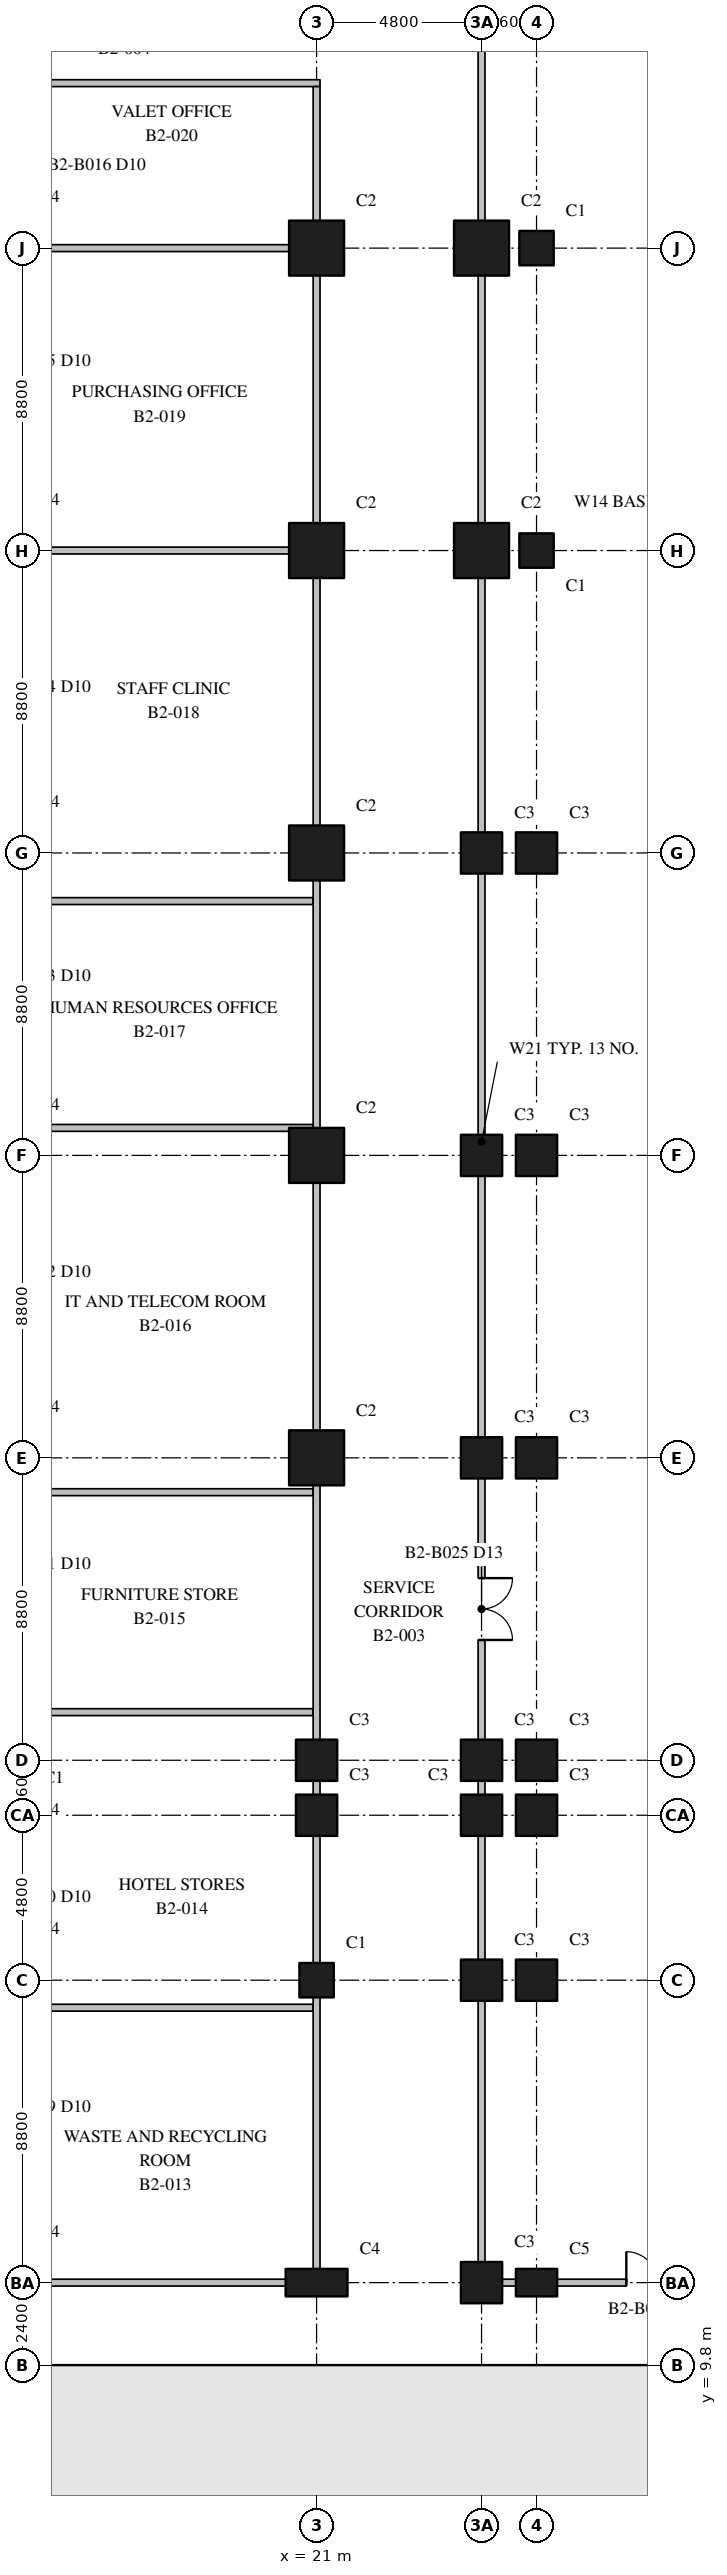
"""IFC4 building model, lengths in metres.
Left out: names, types, materials, properties, quantities, classifications, styles, units other than length and angle.
Written with IfcOpenShell. Run it as: python <this file> out.ifc"""

import sys

from ifc_helpers import new_model, si_unit, direction, frame, frame_2d, origin, origin_2d, place, context, subcontext, project, spatial, rectangle, extrude, element, fill, save


model = new_model("IFC4")
c1 = context("Model", 3, precision=1e-05, world=origin(), true_north=direction((0.0, 1.0)))
c2 = subcontext(c1, "Body", "Model", "MODEL_VIEW")
j1 = project(units=[si_unit("LENGTHUNIT", "METRE"), si_unit("PLANEANGLEUNIT", "RADIAN")], contexts=[c1])
p1 = place(None, origin())
s1 = spatial("IfcSite", under=j1, at=p1, CompositionType="ELEMENT")
p2 = place(p1, origin())
s2 = spatial("IfcBuilding", under=s1, at=p2, CompositionType="ELEMENT")
p3 = place(p2, frame((0.0, 0.0, -12.0)))
s3 = spatial("IfcBuildingStorey", under=s2, at=p3, CompositionType="ELEMENT", Elevation=-12.0)
p4 = place(p3, frame((21.0, 12.2, 0.0), z_axis=(0.0, 0.0, 1.0), x_axis=(1.0, 0.0, 0.0)))
e1 = element("IfcColumn", 1, at=p4, inside=s3, PredefinedType="COLUMN", context=c2, shape_type="SweptSolid", body=[
    extrude(rectangle(XDim=1.8, YDim=0.8, at=origin_2d()), origin(), (0.0, 0.0, 1.0), 5.0),
])
p5 = place(p3, frame((21.0, 21.0, 0.0), z_axis=(0.0, 0.0, 1.0), x_axis=(1.0, 0.0, 0.0)))
e2 = element("IfcColumn", 2, at=p5, inside=s3, PredefinedType="COLUMN", context=c2, shape_type="SweptSolid", body=[
    extrude(rectangle(XDim=1.0, YDim=1.0, at=origin_2d()), origin(), (0.0, 0.0, 1.0), 5.0),
])
for number, where, z_axis, x_axis in (
    (3, (21.0, 25.8, 0.0), (0.0, 0.0, 1.0), (1.0, 0.0, 0.0)),
    (4, (21.0, 27.4, 0.0), (0.0, 0.0, 1.0), (1.0, 0.0, 0.0)),
):
    element("IfcColumn", number, at=place(p3, frame(where, z_axis=z_axis, x_axis=x_axis)), inside=s3, PredefinedType="COLUMN", context=c2, shape_type="SweptSolid", body=[
        extrude(rectangle(XDim=1.2, YDim=1.2, at=origin_2d()), origin(), (0.0, 0.0, 1.0), 5.0),
    ])
for number, where, z_axis, x_axis in (
    (5, (21.0, 36.2, 0.0), (0.0, 0.0, 1.0), (1.0, 0.0, 0.0)),
    (6, (21.0, 45.0, 0.0), (0.0, 0.0, 1.0), (1.0, 0.0, 0.0)),
    (7, (21.0, 53.8, 0.0), (0.0, 0.0, 1.0), (1.0, 0.0, 0.0)),
    (8, (21.0, 62.6, 0.0), (0.0, 0.0, 1.0), (1.0, 0.0, 0.0)),
    (9, (21.0, 71.4, 0.0), (0.0, 0.0, 1.0), (1.0, 0.0, 0.0)),
):
    element("IfcColumn", number, at=place(p3, frame(where, z_axis=z_axis, x_axis=x_axis)), inside=s3, PredefinedType="COLUMN", context=c2, shape_type="SweptSolid", body=[
        extrude(rectangle(XDim=1.6, YDim=1.6, at=origin_2d()), origin(), (0.0, 0.0, 1.0), 5.0),
    ])
for number, where, z_axis, x_axis in (
    (10, (25.8, 12.2, 0.0), (0.0, 0.0, 1.0), (1.0, 0.0, 0.0)),
    (11, (25.8, 21.0, 0.0), (0.0, 0.0, 1.0), (1.0, 0.0, 0.0)),
    (12, (25.8, 25.8, 0.0), (0.0, 0.0, 1.0), (1.0, 0.0, 0.0)),
    (13, (25.8, 27.4, 0.0), (0.0, 0.0, 1.0), (1.0, 0.0, 0.0)),
    (14, (25.8, 36.2, 0.0), (0.0, 0.0, 1.0), (1.0, 0.0, 0.0)),
    (15, (25.8, 45.0, 0.0), (0.0, 0.0, 1.0), (1.0, 0.0, 0.0)),
    (16, (25.8, 53.8, 0.0), (0.0, 0.0, 1.0), (1.0, 0.0, 0.0)),
):
    element("IfcColumn", number, at=place(p3, frame(where, z_axis=z_axis, x_axis=x_axis)), inside=s3, PredefinedType="COLUMN", context=c2, shape_type="SweptSolid", body=[
        extrude(rectangle(XDim=1.2, YDim=1.2, at=origin_2d()), origin(), (0.0, 0.0, 1.0), 5.0),
    ])
for number, where, z_axis, x_axis in (
    (17, (25.8, 62.6, 0.0), (0.0, 0.0, 1.0), (1.0, 0.0, 0.0)),
    (18, (25.8, 71.4, 0.0), (0.0, 0.0, 1.0), (1.0, 0.0, 0.0)),
):
    element("IfcColumn", number, at=place(p3, frame(where, z_axis=z_axis, x_axis=x_axis)), inside=s3, PredefinedType="COLUMN", context=c2, shape_type="SweptSolid", body=[
        extrude(rectangle(XDim=1.6, YDim=1.6, at=origin_2d()), origin(), (0.0, 0.0, 1.0), 5.0),
    ])
p6 = place(p3, frame((27.4, 12.2, 0.0), z_axis=(0.0, 0.0, 1.0), x_axis=(1.0, 0.0, 0.0)))
e19 = element("IfcColumn", 19, at=p6, inside=s3, PredefinedType="COLUMN", context=c2, shape_type="SweptSolid", body=[
    extrude(rectangle(XDim=1.2, YDim=0.8, at=origin_2d()), origin(), (0.0, 0.0, 1.0), 5.0),
])
for number, where, z_axis, x_axis in (
    (20, (27.4, 21.0, 0.0), (0.0, 0.0, 1.0), (1.0, 0.0, 0.0)),
    (21, (27.4, 25.8, 0.0), (0.0, 0.0, 1.0), (1.0, 0.0, 0.0)),
    (22, (27.4, 27.4, 0.0), (0.0, 0.0, 1.0), (1.0, 0.0, 0.0)),
    (23, (27.4, 36.2, 0.0), (0.0, 0.0, 1.0), (1.0, 0.0, 0.0)),
    (24, (27.4, 45.0, 0.0), (0.0, 0.0, 1.0), (1.0, 0.0, 0.0)),
    (25, (27.4, 53.8, 0.0), (0.0, 0.0, 1.0), (1.0, 0.0, 0.0)),
):
    element("IfcColumn", number, at=place(p3, frame(where, z_axis=z_axis, x_axis=x_axis)), inside=s3, PredefinedType="COLUMN", context=c2, shape_type="SweptSolid", body=[
        extrude(rectangle(XDim=1.2, YDim=1.2, at=origin_2d()), origin(), (0.0, 0.0, 1.0), 5.0),
    ])
for number, where, z_axis, x_axis in (
    (26, (27.4, 62.6, 0.0), (0.0, 0.0, 1.0), (1.0, 0.0, 0.0)),
    (27, (27.4, 71.4, 0.0), (0.0, 0.0, 1.0), (1.0, 0.0, 0.0)),
):
    element("IfcColumn", number, at=place(p3, frame(where, z_axis=z_axis, x_axis=x_axis)), inside=s3, PredefinedType="COLUMN", context=c2, shape_type="SweptSolid", body=[
        extrude(rectangle(XDim=1.0, YDim=1.0, at=origin_2d()), origin(), (0.0, 0.0, 1.0), 5.0),
    ])
p7 = place(p3, frame((9.8, 9.6, 0.0), z_axis=(0.0, 0.0, 1.0), x_axis=(1.0, 0.0, 0.0)))
e28 = element("IfcWall", 28, at=p7, inside=s3, PredefinedType="SHEAR", context=c2, shape_type="SweptSolid", body=[
    extrude(rectangle(XDim=4.3, YDim=0.4, at=frame_2d((2.15, 0.0))), origin(), (0.0, 0.0, 1.0), 5.0),
])
p8 = place(p7, frame((2.05, 0.0, 0.0)))
e29 = element("IfcOpeningElement", 29, at=p8, cuts=e28, PredefinedType="OPENING", context=c2, shape_type="SweptSolid", body=[
    extrude(rectangle(XDim=1.2, YDim=2.1, at=frame_2d((0.6, 1.05))), frame((0.0, 0.21, 0.0), z_axis=(0.0, -1.0, 0.0), x_axis=(1.0, 0.0, 0.0)), (0.0, 0.0, 1.0), 0.42),
])
p9 = place(p3, frame((14.1, 9.6, 0.0), z_axis=(0.0, 0.0, 1.0), x_axis=(1.0, 0.0, 0.0)))
e30 = element("IfcWall", 30, at=p9, inside=s3, PredefinedType="SHEAR", context=c2, shape_type="SweptSolid", body=[
    extrude(rectangle(XDim=10.4, YDim=0.4, at=frame_2d((5.2, 0.0))), origin(), (0.0, 0.0, 1.0), 5.0),
])
p10 = place(p9, frame((0.8, 0.0, 0.0)))
e31 = element("IfcOpeningElement", 31, at=p10, cuts=e30, PredefinedType="OPENING", context=c2, shape_type="SweptSolid", body=[
    extrude(rectangle(XDim=1.0, YDim=2.1, at=frame_2d((0.5, 1.05))), frame((0.0, 0.21, 0.0), z_axis=(0.0, -1.0, 0.0), x_axis=(1.0, 0.0, 0.0)), (0.0, 0.0, 1.0), 0.42),
])
p11 = place(p3, frame((27.1, 9.6, 0.0), z_axis=(0.0, 0.0, 1.0), x_axis=(1.0, 0.0, 0.0)))
e32 = element("IfcWall", 32, at=p11, inside=s3, PredefinedType="SHEAR", context=c2, shape_type="SweptSolid", body=[
    extrude(rectangle(XDim=13.6, YDim=0.4, at=frame_2d((6.8, 0.0))), origin(), (0.0, 0.0, 1.0), 5.0),
])
p12 = place(p11, frame((0.85, 0.0, 0.0)))
e33 = element("IfcOpeningElement", 33, at=p12, cuts=e32, PredefinedType="OPENING", context=c2, shape_type="SweptSolid", body=[
    extrude(rectangle(XDim=0.9, YDim=2.1, at=frame_2d((0.45, 1.05))), frame((0.0, 0.21, 0.0), z_axis=(0.0, -1.0, 0.0), x_axis=(1.0, 0.0, 0.0)), (0.0, 0.0, 1.0), 0.42),
])
p13 = place(p11, frame((3.4, 0.0, 0.0)))
e34 = element("IfcOpeningElement", 34, at=p13, cuts=e32, PredefinedType="OPENING", context=c2, shape_type="SweptSolid", body=[
    extrude(rectangle(XDim=1.0, YDim=2.1, at=frame_2d((0.5, 1.05))), frame((0.0, 0.21, 0.0), z_axis=(0.0, -1.0, 0.0), x_axis=(1.0, 0.0, 0.0)), (0.0, 0.0, 1.0), 0.42),
])
p14 = place(p3, frame((14.1, 6.8, 0.0), z_axis=(0.0, 0.0, 1.0), x_axis=(1.0, 0.0, 0.0)))
e35 = element("IfcWall", 35, at=p14, inside=s3, PredefinedType="SHEAR", context=c2, shape_type="SweptSolid", body=[
    extrude(rectangle(XDim=26.6, YDim=0.4, at=frame_2d((13.3, 0.0))), origin(), (0.0, 0.0, 1.0), 5.0),
])
p15 = place(p14, frame((10.8, 0.0, 0.0)))
e36 = element("IfcOpeningElement", 36, at=p15, cuts=e35, PredefinedType="OPENING", context=c2, shape_type="SweptSolid", body=[
    extrude(rectangle(XDim=1.8, YDim=2.1, at=frame_2d((0.9, 1.05))), frame((0.0, 0.21, 0.0), z_axis=(0.0, -1.0, 0.0), x_axis=(1.0, 0.0, 0.0)), (0.0, 0.0, 1.0), 0.42),
])
p16 = place(p14, frame((24.35, 0.0, 0.0)))
e37 = element("IfcOpeningElement", 37, at=p16, cuts=e35, PredefinedType="OPENING", context=c2, shape_type="SweptSolid", body=[
    extrude(rectangle(XDim=1.3, YDim=2.1, at=frame_2d((0.65, 1.05))), frame((0.0, 0.21, 0.0), z_axis=(0.0, -1.0, 0.0), x_axis=(1.0, 0.0, 0.0)), (0.0, 0.0, 1.0), 0.42),
])
p17 = place(p3, frame((14.1, 1.2, 0.0), z_axis=(0.0, 0.0, 1.0), x_axis=(0.0, 1.0, 0.0)))
e38 = element("IfcWall", 38, at=p17, inside=s3, PredefinedType="SHEAR", context=c2, shape_type="SweptSolid", body=[
    extrude(rectangle(XDim=8.4, YDim=0.4, at=frame_2d((4.2, 0.0))), origin(), (0.0, 0.0, 1.0), 5.0),
])
p18 = place(p17, frame((4.45, 0.0, 0.0)))
e39 = element("IfcOpeningElement", 39, at=p18, cuts=e38, PredefinedType="OPENING", context=c2, shape_type="SweptSolid", body=[
    extrude(rectangle(XDim=0.9, YDim=2.1, at=frame_2d((0.45, 1.05))), frame((0.0, 0.21, 0.0), z_axis=(0.0, -1.0, 0.0), x_axis=(1.0, 0.0, 0.0)), (0.0, 0.0, 1.0), 0.42),
])
for number, where, z_axis, x_axis in (
    (40, (24.5, 7.0, 0.0), (0.0, 0.0, 1.0), (0.0, 1.0, 0.0)),
    (41, (27.1, 7.0, 0.0), (0.0, 0.0, 1.0), (0.0, 1.0, 0.0)),
):
    element("IfcWall", number, at=place(p3, frame(where, z_axis=z_axis, x_axis=x_axis)), inside=s3, PredefinedType="SHEAR", context=c2, shape_type="SweptSolid", body=[
        extrude(rectangle(XDim=2.4, YDim=0.25, at=frame_2d((1.2, 0.0))), origin(), (0.0, 0.0, 1.0), 5.0),
    ])
p19 = place(p3, frame((20.0, 4.0, 0.0), z_axis=(0.0, 0.0, 1.0), x_axis=(0.0, 1.0, 0.0)))
e42 = element("IfcWall", 42, at=p19, inside=s3, PredefinedType="PARTITIONING", context=c2, shape_type="SweptSolid", body=[
    extrude(rectangle(XDim=2.6, YDim=0.2, at=frame_2d((1.3, 0.0))), origin(), (0.0, 0.0, 1.0), 4.598),
])
p20 = place(p19, frame((0.4, 0.0, 0.0)))
e43 = element("IfcOpeningElement", 43, at=p20, cuts=e42, PredefinedType="OPENING", context=c2, shape_type="SweptSolid", body=[
    extrude(rectangle(XDim=1.8, YDim=2.1, at=frame_2d((0.9, 1.05))), frame((0.0, 0.11, 0.0), z_axis=(0.0, -1.0, 0.0), x_axis=(1.0, 0.0, 0.0)), (0.0, 0.0, 1.0), 0.22),
])
p21 = place(p3, frame((29.7, 7.0, 0.0), z_axis=(0.0, 0.0, 1.0), x_axis=(0.0, 1.0, 0.0)))
e44 = element("IfcWall", 44, at=p21, inside=s3, PredefinedType="PARTITIONING", context=c2, shape_type="SweptSolid", body=[
    extrude(rectangle(XDim=2.4, YDim=0.15, at=frame_2d((1.2, 0.0))), origin(), (0.0, 0.0, 1.0), 4.598),
])
p22 = place(p3, frame((12.1, 12.2, 0.0), z_axis=(0.0, 0.0, 1.0), x_axis=(1.0, 0.0, 0.0)))
e45 = element("IfcWall", 45, at=p22, inside=s3, PredefinedType="PARTITIONING", context=c2, shape_type="SweptSolid", body=[
    extrude(rectangle(XDim=9.0, YDim=0.2, at=frame_2d((4.5, 0.0))), origin(), (0.0, 0.0, 1.0), 4.598),
])
p23 = place(p3, frame((25.7, 12.2, 0.0), z_axis=(0.0, 0.0, 1.0), x_axis=(1.0, 0.0, 0.0)))
e46 = element("IfcWall", 46, at=p23, inside=s3, PredefinedType="PARTITIONING", context=c2, shape_type="SweptSolid", body=[
    extrude(rectangle(XDim=20.55, YDim=0.2, at=frame_2d((10.275, 0.0))), origin(), (0.0, 0.0, 1.0), 4.598),
])
p24 = place(p23, frame((4.312, 0.0, 0.0)))
e47 = element("IfcOpeningElement", 47, at=p24, cuts=e46, PredefinedType="OPENING", context=c2, shape_type="SweptSolid", body=[
    extrude(rectangle(XDim=1.8, YDim=2.1, at=frame_2d((0.9, 1.05))), frame((0.0, 0.11, 0.0), z_axis=(0.0, -1.0, 0.0), x_axis=(1.0, 0.0, 0.0)), (0.0, 0.0, 1.0), 0.22),
])
p25 = place(p23, frame((15.56, 0.0, 0.0)))
e48 = element("IfcOpeningElement", 48, at=p25, cuts=e46, PredefinedType="OPENING", context=c2, shape_type="SweptSolid", body=[
    extrude(rectangle(XDim=1.8, YDim=2.1, at=frame_2d((0.9, 1.05))), frame((0.0, 0.11, 0.0), z_axis=(0.0, -1.0, 0.0), x_axis=(1.0, 0.0, 0.0)), (0.0, 0.0, 1.0), 0.22),
])
p26 = place(p3, frame((12.1, 76.2, 0.0), z_axis=(0.0, 0.0, 1.0), x_axis=(1.0, 0.0, 0.0)))
e49 = element("IfcWall", 49, at=p26, inside=s3, PredefinedType="PARTITIONING", context=c2, shape_type="SweptSolid", body=[
    extrude(rectangle(XDim=9.0, YDim=0.2, at=frame_2d((4.5, 0.0))), origin(), (0.0, 0.0, 1.0), 4.598),
])
for number, where, z_axis, x_axis in (
    (50, (12.3, 20.2, 0.0), (0.0, 0.0, 1.0), (1.0, 0.0, 0.0)),
    (51, (12.3, 28.8, 0.0), (0.0, 0.0, 1.0), (1.0, 0.0, 0.0)),
    (52, (12.3, 35.2, 0.0), (0.0, 0.0, 1.0), (1.0, 0.0, 0.0)),
    (53, (12.3, 45.8, 0.0), (0.0, 0.0, 1.0), (1.0, 0.0, 0.0)),
    (54, (12.3, 52.4, 0.0), (0.0, 0.0, 1.0), (1.0, 0.0, 0.0)),
    (55, (12.3, 62.6, 0.0), (0.0, 0.0, 1.0), (1.0, 0.0, 0.0)),
    (56, (12.3, 71.4, 0.0), (0.0, 0.0, 1.0), (1.0, 0.0, 0.0)),
):
    element("IfcWall", number, at=place(p3, frame(where, z_axis=z_axis, x_axis=x_axis)), inside=s3, PredefinedType="PARTITIONING", context=c2, shape_type="SweptSolid", body=[
        extrude(rectangle(XDim=8.6, YDim=0.2, at=frame_2d((4.3, 0.0))), origin(), (0.0, 0.0, 1.0), 4.598),
    ])
p27 = place(p3, frame((21.0, 12.3, 0.0), z_axis=(0.0, 0.0, 1.0), x_axis=(0.0, 1.0, 0.0)))
e57 = element("IfcWall", 57, at=p27, inside=s3, PredefinedType="PARTITIONING", context=c2, shape_type="SweptSolid", body=[
    extrude(rectangle(XDim=63.8, YDim=0.2, at=frame_2d((31.9, 0.0))), origin(), (0.0, 0.0, 1.0), 4.598),
])
p28 = place(p3, frame((25.8, 12.3, 0.0), z_axis=(0.0, 0.0, 1.0), x_axis=(0.0, 1.0, 0.0)))
e58 = element("IfcWall", 58, at=p28, inside=s3, PredefinedType="PARTITIONING", context=c2, shape_type="SweptSolid", body=[
    extrude(rectangle(XDim=66.2, YDim=0.2, at=frame_2d((33.1, 0.0))), origin(), (0.0, 0.0, 1.0), 4.598),
])
p29 = place(p28, frame((18.6, 0.0, 0.0)))
e59 = element("IfcOpeningElement", 59, at=p29, cuts=e58, PredefinedType="OPENING", context=c2, shape_type="SweptSolid", body=[
    extrude(rectangle(XDim=1.8, YDim=2.1, at=frame_2d((0.9, 1.05))), frame((0.0, 0.11, 0.0), z_axis=(0.0, -1.0, 0.0), x_axis=(1.0, 0.0, 0.0)), (0.0, 0.0, 1.0), 0.22),
])
p30 = place(p20, origin())
e60 = element("IfcDoor", 60, at=p30, inside=s3, OperationType="DOUBLE_DOOR_SINGLE_SWING", PredefinedType="DOOR", context=c2, shape_type="SweptSolid", body=[
    extrude(rectangle(XDim=1.8, YDim=2.1, at=frame_2d((0.9, 1.05))), frame((0.0, 0.025, 0.0), z_axis=(0.0, -1.0, 0.0), x_axis=(1.0, 0.0, 0.0)), (0.0, 0.0, 1.0), 0.05),
])
fill(e43, e60)
p31 = place(p15, frame((1.8, 0.0, 0.0), z_axis=(0.0, 0.0, 1.0), x_axis=(-1.0, 0.0, 0.0)))
e61 = element("IfcDoor", 61, at=p31, inside=s3, OperationType="DOUBLE_DOOR_SINGLE_SWING", PredefinedType="DOOR", context=c2, shape_type="SweptSolid", body=[
    extrude(rectangle(XDim=1.8, YDim=2.1, at=frame_2d((0.9, 1.05))), frame((0.0, 0.025, 0.0), z_axis=(0.0, -1.0, 0.0), x_axis=(1.0, 0.0, 0.0)), (0.0, 0.0, 1.0), 0.05),
])
fill(e36, e61)
p32 = place(p10, frame((1.0, 0.0, 0.0), z_axis=(0.0, 0.0, 1.0), x_axis=(-1.0, 0.0, 0.0)))
e62 = element("IfcDoor", 62, at=p32, inside=s3, OperationType="SINGLE_SWING_RIGHT", PredefinedType="DOOR", context=c2, shape_type="SweptSolid", body=[
    extrude(rectangle(XDim=1.0, YDim=2.1, at=frame_2d((0.5, 1.05))), frame((0.0, 0.025, 0.0), z_axis=(0.0, -1.0, 0.0), x_axis=(1.0, 0.0, 0.0)), (0.0, 0.0, 1.0), 0.05),
])
fill(e31, e62)
p33 = place(p12, frame((0.9, 0.0, 0.0), z_axis=(0.0, 0.0, 1.0), x_axis=(-1.0, 0.0, 0.0)))
e63 = element("IfcDoor", 63, at=p33, inside=s3, OperationType="SINGLE_SWING_RIGHT", PredefinedType="DOOR", context=c2, shape_type="SweptSolid", body=[
    extrude(rectangle(XDim=0.9, YDim=2.1, at=frame_2d((0.45, 1.05))), frame((0.0, 0.025, 0.0), z_axis=(0.0, -1.0, 0.0), x_axis=(1.0, 0.0, 0.0)), (0.0, 0.0, 1.0), 0.05),
])
fill(e33, e63)
p34 = place(p13, frame((1.0, 0.0, 0.0), z_axis=(0.0, 0.0, 1.0), x_axis=(-1.0, 0.0, 0.0)))
e64 = element("IfcDoor", 64, at=p34, inside=s3, OperationType="SINGLE_SWING_RIGHT", PredefinedType="DOOR", context=c2, shape_type="SweptSolid", body=[
    extrude(rectangle(XDim=1.0, YDim=2.1, at=frame_2d((0.5, 1.05))), frame((0.0, 0.025, 0.0), z_axis=(0.0, -1.0, 0.0), x_axis=(1.0, 0.0, 0.0)), (0.0, 0.0, 1.0), 0.05),
])
fill(e34, e64)
p35 = place(p18, origin())
e65 = element("IfcDoor", 65, at=p35, inside=s3, OperationType="SINGLE_SWING_RIGHT", PredefinedType="DOOR", context=c2, shape_type="SweptSolid", body=[
    extrude(rectangle(XDim=0.9, YDim=2.1, at=frame_2d((0.45, 1.05))), frame((0.0, 0.025, 0.0), z_axis=(0.0, -1.0, 0.0), x_axis=(1.0, 0.0, 0.0)), (0.0, 0.0, 1.0), 0.05),
])
fill(e39, e65)
p36 = place(p24, origin())
e66 = element("IfcDoor", 66, at=p36, inside=s3, OperationType="DOUBLE_DOOR_SINGLE_SWING", PredefinedType="DOOR", context=c2, shape_type="SweptSolid", body=[
    extrude(rectangle(XDim=1.8, YDim=2.1, at=frame_2d((0.9, 1.05))), frame((0.0, 0.025, 0.0), z_axis=(0.0, -1.0, 0.0), x_axis=(1.0, 0.0, 0.0)), (0.0, 0.0, 1.0), 0.05),
])
fill(e47, e66)
p37 = place(p29, frame((1.8, 0.0, 0.0), z_axis=(0.0, 0.0, 1.0), x_axis=(-1.0, 0.0, 0.0)))
e67 = element("IfcDoor", 67, at=p37, inside=s3, OperationType="DOUBLE_DOOR_SINGLE_SWING", PredefinedType="DOOR", context=c2, shape_type="SweptSolid", body=[
    extrude(rectangle(XDim=1.8, YDim=2.1, at=frame_2d((0.9, 1.05))), frame((0.0, 0.025, 0.0), z_axis=(0.0, -1.0, 0.0), x_axis=(1.0, 0.0, 0.0)), (0.0, 0.0, 1.0), 0.05),
])
fill(e59, e67)
save(model, sys.argv[1])
